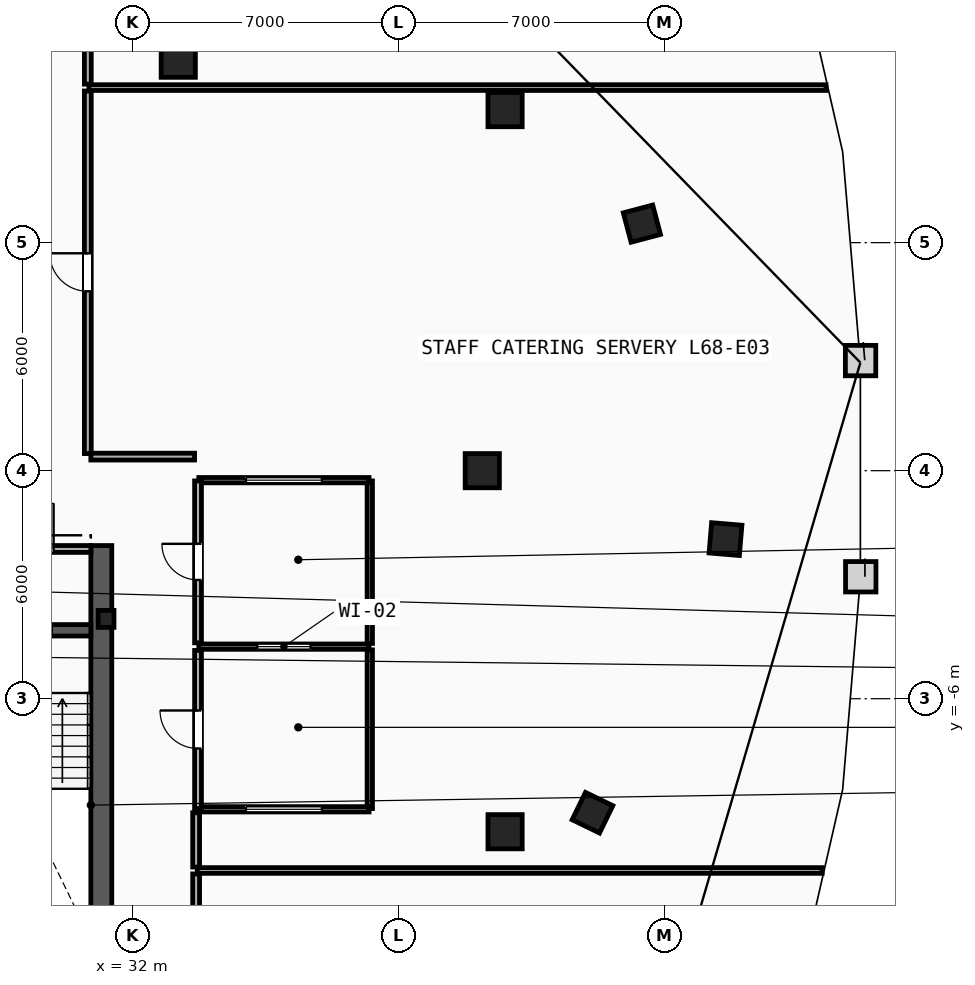
"""IFC4 building model, lengths in metres.
Left out: names, types, materials, properties, quantities, classifications, styles, units other than length and angle.
Written with IfcOpenShell. Run it as: python <this file> out.ifc"""

import sys

from ifc_helpers import new_model, si_unit, direction, frame, frame_2d, origin, origin_2d, place, context, subcontext, project, spatial, rectangle, i_section, extrude, element, fill, save


model = new_model("IFC4")
c1 = context("Model", 3, precision=1e-05, world=origin(), true_north=direction((0.0, 1.0)))
c2 = subcontext(c1, "Body", "Model", "MODEL_VIEW")
j1 = project(units=[si_unit("LENGTHUNIT", "METRE"), si_unit("PLANEANGLEUNIT", "RADIAN")], contexts=[c1])
p1 = place(None, origin())
s1 = spatial("IfcSite", under=j1, at=p1, CompositionType="ELEMENT")
p2 = place(p1, origin())
s2 = spatial("IfcBuilding", under=s1, at=p2, CompositionType="ELEMENT")
p3 = place(p2, frame((0.0, 0.0, 257.6)))
s3 = spatial("IfcBuildingStorey", under=s2, at=p3, CompositionType="ELEMENT", Elevation=257.6)
p4 = place(p3, frame((31.3, -3.9, 0.0), z_axis=(0.0, 0.0, 1.0), x_axis=(1.0, 0.0, 0.0)))
e1 = element("IfcColumn", 1, at=p4, inside=s3, PredefinedType="COLUMN", context=c2, shape_type="SweptSolid", body=[
    extrude(i_section(OverallWidth=0.416, OverallDepth=0.446, WebThickness=0.039, FlangeThickness=0.063, FilletRadius=0.018, at=origin_2d()), origin(), (0.0, 0.0, 1.0), 3.6),
])
for number, where, z_axis, x_axis in (
    (2, (41.2, 0.0, 0.0), (0.0, 0.0, 1.0), (1.0, 0.0, 0.0)),
    (3, (41.8, -9.5, 0.0), (0.0, 0.0, 1.0), (1.0, 0.0, 0.0)),
    (4, (41.8, 9.5, 0.0), (0.0, 0.0, 1.0), (1.0, 0.0, 0.0)),
    (5, (33.2, 10.8, 0.0), (0.0, 0.0, 1.0), (1.0, 0.0, 0.0)),
):
    element("IfcColumn", number, at=place(p3, frame(where, z_axis=z_axis, x_axis=x_axis)), inside=s3, PredefinedType="COLUMN", context=c2, shape_type="SweptSolid", body=[
        extrude(rectangle(XDim=0.9, YDim=0.9, at=origin_2d()), origin(), (0.0, 0.0, 1.0), 3.6),
    ])
for number, where, z_axis, x_axis in (
    (6, (44.1, -9.0, 0.0), (0.0, 0.0, 1.0), (0.437, 0.899, 0.0)),
    (7, (47.6, -1.8, 0.0), (0.0, 0.0, 1.0), (0.084, 0.997, 0.0)),
    (8, (45.4, 6.5, 0.0), (0.0, 0.0, 1.0), (-0.256, 0.967, 0.0)),
):
    element("IfcColumn", number, at=place(p3, frame(where, z_axis=z_axis, x_axis=x_axis)), inside=s3, PredefinedType="COLUMN", context=c2, shape_type="SweptSolid", body=[
        extrude(rectangle(XDim=0.8, YDim=0.8, at=origin_2d()), origin(), (0.0, 0.0, 1.0), 3.6),
    ])
p5 = place(p3, frame((31.175, -15.3, 0.0), z_axis=(0.0, 0.0, 1.0), x_axis=(0.0, 1.0, 0.0)))
e9 = element("IfcWall", 9, at=p5, inside=s3, PredefinedType="SHEAR", context=c2, shape_type="SweptSolid", body=[
    extrude(rectangle(XDim=13.33, YDim=0.55, at=frame_2d((6.665, 0.0))), origin(), (0.0, 0.0, 1.0), 3.34),
])
p6 = place(p3, frame((27.74, -4.2, 0.0), z_axis=(0.0, 0.0, 1.0), x_axis=(1.0, 0.0, 0.0)))
e10 = element("IfcWall", 10, at=p6, inside=s3, PredefinedType="SHEAR", context=c2, shape_type="SweptSolid", body=[
    extrude(rectangle(XDim=3.16, YDim=0.3, at=frame_2d((1.58, 0.0))), origin(), (0.0, 0.0, 1.0), 3.34),
])
p7 = place(p6, frame((1.03, 0.0, 0.0)))
e11 = element("IfcOpeningElement", 11, at=p7, cuts=e10, PredefinedType="OPENING", context=c2, shape_type="SweptSolid", body=[
    extrude(rectangle(XDim=1.1, YDim=2.15, at=frame_2d((0.55, 1.075))), frame((0.0, 0.16, 0.0), z_axis=(0.0, -1.0, 0.0), x_axis=(1.0, 0.0, 0.0)), (0.0, 0.0, 1.0), 0.32),
])
p8 = place(p3, frame((27.74, -2.06, 0.0), z_axis=(0.0, 0.0, 1.0), x_axis=(1.0, 0.0, 0.0)))
e12 = element("IfcWall", 12, at=p8, inside=s3, PredefinedType="PARTITIONING", context=c2, shape_type="SweptSolid", body=[
    extrude(rectangle(XDim=3.16, YDim=0.18, at=frame_2d((1.58, 0.0))), origin(), (0.0, 0.0, 1.0), 3.34),
])
p9 = place(p8, frame((0.98, 0.0, 0.0)))
e13 = element("IfcOpeningElement", 13, at=p9, cuts=e12, PredefinedType="OPENING", context=c2, shape_type="SweptSolid", body=[
    extrude(rectangle(XDim=1.2, YDim=2.15, at=frame_2d((0.6, 1.075))), frame((0.0, 0.1, 0.0), z_axis=(0.0, -1.0, 0.0), x_axis=(1.0, 0.0, 0.0)), (0.0, 0.0, 1.0), 0.2),
])
p10 = place(p3, frame((38.24, -8.89, 0.0), z_axis=(0.0, 0.0, 1.0), x_axis=(0.0, 1.0, 0.0)))
e14 = element("IfcWall", 14, at=p10, inside=s3, PredefinedType="PARTITIONING", context=c2, shape_type="SweptSolid", body=[
    extrude(rectangle(XDim=4.175, YDim=0.14, at=frame_2d((2.087, 0.0))), origin(), (0.0, 0.0, 1.0), 3.34),
])
p11 = place(p3, frame((38.24, -4.545, 0.0), z_axis=(0.0, 0.0, 1.0), x_axis=(0.0, 1.0, 0.0)))
e15 = element("IfcWall", 15, at=p11, inside=s3, PredefinedType="PARTITIONING", context=c2, shape_type="SweptSolid", body=[
    extrude(rectangle(XDim=4.275, YDim=0.14, at=frame_2d((2.137, 0.0))), origin(), (0.0, 0.0, 1.0), 3.34),
])
p12 = place(p3, frame((33.74, -0.25, 0.0), z_axis=(0.0, 0.0, 1.0), x_axis=(1.0, 0.0, 0.0)))
e16 = element("IfcWall", 16, at=p12, inside=s3, PredefinedType="PARTITIONING", context=c2, shape_type="SweptSolid", body=[
    extrude(rectangle(XDim=4.48, YDim=0.14, at=frame_2d((2.24, 0.0))), origin(), (0.0, 0.0, 1.0), 3.34),
])
p13 = place(p12, frame((1.24, 0.0, 1.05)))
e17 = element("IfcOpeningElement", 17, at=p13, cuts=e16, PredefinedType="OPENING", context=c2, shape_type="SweptSolid", body=[
    extrude(rectangle(XDim=2.0, YDim=1.5, at=frame_2d((1.0, 0.75))), frame((0.0, 0.08, 0.0), z_axis=(0.0, -1.0, 0.0), x_axis=(1.0, 0.0, 0.0)), (0.0, 0.0, 1.0), 0.16),
])
p14 = place(p3, frame((33.74, -4.63, 0.0), z_axis=(0.0, 0.0, 1.0), x_axis=(1.0, 0.0, 0.0)))
e18 = element("IfcWall", 18, at=p14, inside=s3, PredefinedType="PARTITIONING", context=c2, shape_type="SweptSolid", body=[
    extrude(rectangle(XDim=4.48, YDim=0.14, at=frame_2d((2.24, 0.0))), origin(), (0.0, 0.0, 1.0), 3.34),
])
p15 = place(p14, frame((1.54, 0.0, 1.05)))
e19 = element("IfcOpeningElement", 19, at=p15, cuts=e18, PredefinedType="OPENING", context=c2, shape_type="SweptSolid", body=[
    extrude(rectangle(XDim=1.4, YDim=1.5, at=frame_2d((0.7, 0.75))), frame((0.0, 0.08, 0.0), z_axis=(0.0, -1.0, 0.0), x_axis=(1.0, 0.0, 0.0)), (0.0, 0.0, 1.0), 0.16),
])
p16 = place(p3, frame((33.74, -8.91, 0.0), z_axis=(0.0, 0.0, 1.0), x_axis=(1.0, 0.0, 0.0)))
e20 = element("IfcWall", 20, at=p16, inside=s3, PredefinedType="PARTITIONING", context=c2, shape_type="SweptSolid", body=[
    extrude(rectangle(XDim=4.48, YDim=0.14, at=frame_2d((2.24, 0.0))), origin(), (0.0, 0.0, 1.0), 3.34),
])
p17 = place(p16, frame((1.24, 0.0, 1.05)))
e21 = element("IfcOpeningElement", 21, at=p17, cuts=e20, PredefinedType="OPENING", context=c2, shape_type="SweptSolid", body=[
    extrude(rectangle(XDim=2.0, YDim=1.5, at=frame_2d((1.0, 0.75))), frame((0.0, 0.08, 0.0), z_axis=(0.0, -1.0, 0.0), x_axis=(1.0, 0.0, 0.0)), (0.0, 0.0, 1.0), 0.16),
])
p18 = place(p3, frame((33.72, -4.53, 0.0), z_axis=(0.0, 0.0, 1.0), x_axis=(0.0, 1.0, 0.0)))
e22 = element("IfcWall", 22, at=p18, inside=s3, PredefinedType="PARTITIONING", context=c2, shape_type="SweptSolid", body=[
    extrude(rectangle(XDim=4.26, YDim=0.18, at=frame_2d((2.13, 0.0))), origin(), (0.0, 0.0, 1.0), 3.34),
])
p19 = place(p18, frame((1.655, 0.0, 0.0)))
e23 = element("IfcOpeningElement", 23, at=p19, cuts=e22, PredefinedType="OPENING", context=c2, shape_type="SweptSolid", body=[
    extrude(rectangle(XDim=0.95, YDim=2.1, at=frame_2d((0.475, 1.05))), frame((0.0, 0.1, 0.0), z_axis=(0.0, -1.0, 0.0), x_axis=(1.0, 0.0, 0.0)), (0.0, 0.0, 1.0), 0.2),
])
p20 = place(p3, frame((33.72, -8.89, 0.0), z_axis=(0.0, 0.0, 1.0), x_axis=(0.0, 1.0, 0.0)))
e24 = element("IfcWall", 24, at=p20, inside=s3, PredefinedType="PARTITIONING", context=c2, shape_type="SweptSolid", body=[
    extrude(rectangle(XDim=4.16, YDim=0.18, at=frame_2d((2.08, 0.0))), origin(), (0.0, 0.0, 1.0), 3.34),
])
p21 = place(p20, frame((1.58, 0.0, 0.0)))
e25 = element("IfcOpeningElement", 25, at=p21, cuts=e24, PredefinedType="OPENING", context=c2, shape_type="SweptSolid", body=[
    extrude(rectangle(XDim=1.0, YDim=2.15, at=frame_2d((0.5, 1.075))), frame((0.0, 0.1, 0.0), z_axis=(0.0, -1.0, 0.0), x_axis=(1.0, 0.0, 0.0)), (0.0, 0.0, 1.0), 0.2),
])
p22 = place(p3, frame((30.85, 10.08, 0.0), z_axis=(0.0, 0.0, 1.0), x_axis=(1.0, 0.0, 0.0)))
e26 = element("IfcWall", 26, at=p22, inside=s3, PredefinedType="PARTITIONING", context=c2, shape_type="SweptSolid", body=[
    extrude(rectangle(XDim=19.395, YDim=0.15, at=frame_2d((9.697, 0.0))), origin(), (0.0, 0.0, 1.0), 2.724),
])
p23 = place(p3, frame((33.7, -10.52, 0.0), z_axis=(0.0, 0.0, 1.0), x_axis=(1.0, 0.0, 0.0)))
e27 = element("IfcWall", 27, at=p23, inside=s3, PredefinedType="PARTITIONING", context=c2, shape_type="SweptSolid", body=[
    extrude(rectangle(XDim=16.444, YDim=0.15, at=frame_2d((8.222, 0.0))), origin(), (0.0, 0.0, 1.0), 3.34),
])
p24 = place(p3, frame((33.67, -17.428, 0.0), z_axis=(0.0, 0.0, 1.0), x_axis=(0.0, 1.0, 0.0)))
e28 = element("IfcWall", 28, at=p24, inside=s3, PredefinedType="PARTITIONING", context=c2, shape_type="SweptSolid", body=[
    extrude(rectangle(XDim=6.818, YDim=0.18, at=frame_2d((3.409, 0.0))), origin(), (0.0, 0.0, 1.0), 3.34),
])
p25 = place(p24, frame((2.909, 0.0, 0.0)))
e29 = element("IfcOpeningElement", 29, at=p25, cuts=e28, PredefinedType="OPENING", context=c2, shape_type="SweptSolid", body=[
    extrude(rectangle(XDim=1.0, YDim=2.15, at=frame_2d((0.5, 1.075))), frame((0.0, 0.1, 0.0), z_axis=(0.0, -1.0, 0.0), x_axis=(1.0, 0.0, 0.0)), (0.0, 0.0, 1.0), 0.2),
])
p26 = place(p3, frame((30.82, 0.45, 0.0), z_axis=(0.0, 0.0, 1.0), x_axis=(0.0, 1.0, 0.0)))
e30 = element("IfcWall", 30, at=p26, inside=s3, PredefinedType="PARTITIONING", context=c2, shape_type="SweptSolid", body=[
    extrude(rectangle(XDim=9.54, YDim=0.18, at=frame_2d((4.77, 0.0))), origin(), (0.0, 0.0, 1.0), 3.34),
])
p27 = place(p26, frame((4.27, 0.0, 0.0)))
e31 = element("IfcOpeningElement", 31, at=p27, cuts=e30, PredefinedType="OPENING", context=c2, shape_type="SweptSolid", body=[
    extrude(rectangle(XDim=1.0, YDim=2.15, at=frame_2d((0.5, 1.075))), frame((0.0, 0.1, 0.0), z_axis=(0.0, -1.0, 0.0), x_axis=(1.0, 0.0, 0.0)), (0.0, 0.0, 1.0), 0.2),
])
p28 = place(p3, frame((33.628, 0.37, 0.0), z_axis=(0.0, 0.0, 1.0), x_axis=(-1.0, 0.0, 0.0)))
e32 = element("IfcWall", 32, at=p28, inside=s3, PredefinedType="PARTITIONING", context=c2, shape_type="SweptSolid", body=[
    extrude(rectangle(XDim=2.729, YDim=0.18, at=frame_2d((1.364, 0.0))), origin(), (0.0, 0.0, 1.0), 3.34),
])
p29 = place(p3, frame((33.67, -10.43, 0.0), z_axis=(0.0, 0.0, 1.0), x_axis=(0.0, 1.0, 0.0)))
e33 = element("IfcWall", 33, at=p29, inside=s3, PredefinedType="PARTITIONING", context=c2, shape_type="SweptSolid", body=[
    extrude(rectangle(XDim=1.428, YDim=0.18, at=frame_2d((0.714, 0.0))), origin(), (0.0, 0.0, 1.0), 3.34),
])
p30 = place(p3, frame((30.82, 10.17, 0.0), z_axis=(0.0, 0.0, 1.0), x_axis=(0.0, 1.0, 0.0)))
e34 = element("IfcWall", 34, at=p30, inside=s3, PredefinedType="PARTITIONING", context=c2, shape_type="SweptSolid", body=[
    extrude(rectangle(XDim=2.609, YDim=0.18, at=frame_2d((1.304, 0.0))), origin(), (0.0, 0.0, 1.0), 3.34),
])
p31 = place(p9, origin())
e35 = element("IfcDoor", 35, at=p31, inside=s3, OperationType="SINGLE_SWING_RIGHT", PredefinedType="DOOR", context=c2, shape_type="SweptSolid", body=[
    extrude(rectangle(XDim=1.2, YDim=2.15, at=frame_2d((0.6, 1.075))), frame((0.0, 0.025, 0.0), z_axis=(0.0, -1.0, 0.0), x_axis=(1.0, 0.0, 0.0)), (0.0, 0.0, 1.0), 0.05),
])
fill(e13, e35)
p32 = place(p27, origin())
e36 = element("IfcDoor", 36, at=p32, inside=s3, OperationType="SINGLE_SWING_RIGHT", PredefinedType="DOOR", context=c2, shape_type="SweptSolid", body=[
    extrude(rectangle(XDim=1.0, YDim=2.15, at=frame_2d((0.5, 1.075))), frame((0.0, 0.025, 0.0), z_axis=(0.0, -1.0, 0.0), x_axis=(1.0, 0.0, 0.0)), (0.0, 0.0, 1.0), 0.05),
])
fill(e31, e36)
p33 = place(p19, origin())
e37 = element("IfcDoor", 37, at=p33, inside=s3, OperationType="SINGLE_SWING_RIGHT", PredefinedType="DOOR", context=c2, shape_type="SweptSolid", body=[
    extrude(rectangle(XDim=0.95, YDim=2.1, at=frame_2d((0.475, 1.05))), frame((0.0, 0.025, 0.0), z_axis=(0.0, -1.0, 0.0), x_axis=(1.0, 0.0, 0.0)), (0.0, 0.0, 1.0), 0.05),
])
fill(e23, e37)
p34 = place(p21, origin())
e38 = element("IfcDoor", 38, at=p34, inside=s3, OperationType="SINGLE_SWING_RIGHT", PredefinedType="DOOR", context=c2, shape_type="SweptSolid", body=[
    extrude(rectangle(XDim=1.0, YDim=2.15, at=frame_2d((0.5, 1.075))), frame((0.0, 0.025, 0.0), z_axis=(0.0, -1.0, 0.0), x_axis=(1.0, 0.0, 0.0)), (0.0, 0.0, 1.0), 0.05),
])
fill(e25, e38)
p35 = place(p13, origin())
e39 = element("IfcWindow", 39, at=p35, inside=s3, PartitioningType="SINGLE_PANEL", PredefinedType="WINDOW", context=c2, shape_type="SweptSolid", body=[
    extrude(rectangle(XDim=2.0, YDim=1.5, at=frame_2d((1.0, 0.75))), frame((0.0, 0.03, 0.0), z_axis=(0.0, -1.0, 0.0), x_axis=(1.0, 0.0, 0.0)), (0.0, 0.0, 1.0), 0.06),
])
fill(e17, e39)
p36 = place(p15, origin())
e40 = element("IfcWindow", 40, at=p36, inside=s3, PartitioningType="SINGLE_PANEL", PredefinedType="WINDOW", context=c2, shape_type="SweptSolid", body=[
    extrude(rectangle(XDim=1.4, YDim=1.5, at=frame_2d((0.7, 0.75))), frame((0.0, 0.03, 0.0), z_axis=(0.0, -1.0, 0.0), x_axis=(1.0, 0.0, 0.0)), (0.0, 0.0, 1.0), 0.06),
])
fill(e19, e40)
p37 = place(p17, origin())
e41 = element("IfcWindow", 41, at=p37, inside=s3, PartitioningType="SINGLE_PANEL", PredefinedType="WINDOW", context=c2, shape_type="SweptSolid", body=[
    extrude(rectangle(XDim=2.0, YDim=1.5, at=frame_2d((1.0, 0.75))), frame((0.0, 0.03, 0.0), z_axis=(0.0, -1.0, 0.0), x_axis=(1.0, 0.0, 0.0)), (0.0, 0.0, 1.0), 0.06),
])
fill(e21, e41)
save(model, sys.argv[1])
